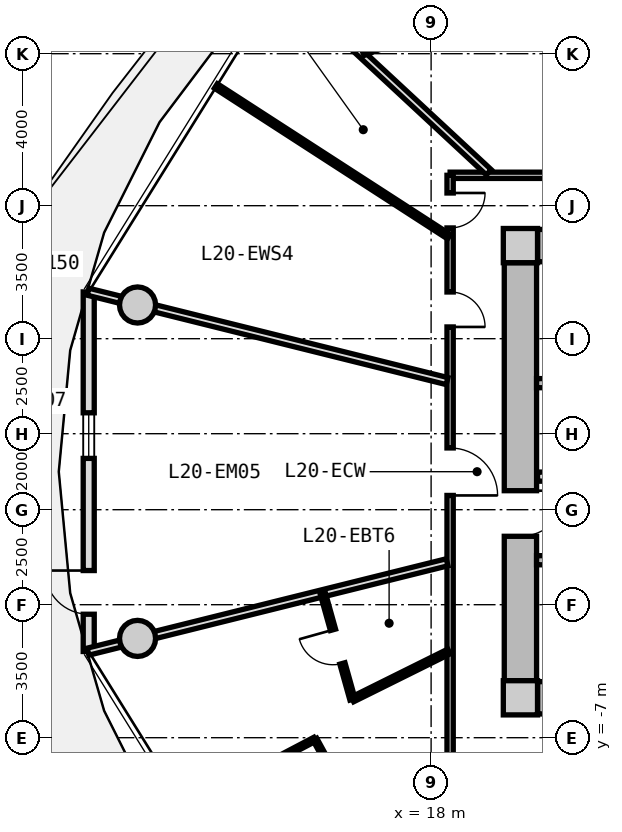
"""IFC4 building model, lengths in metres.
Left out: names, types, materials, properties, quantities, classifications, styles, units other than length and angle.
Written with IfcOpenShell. Run it as: python <this file> out.ifc"""

import sys

from ifc_helpers import new_model, si_unit, direction, frame, frame_2d, origin, origin_2d, place, context, subcontext, project, spatial, rectangle, circle, extrude, source, transform, mapped, element, fill, save


model = new_model("IFC4")
c1 = context("Model", 3, precision=1e-05, world=origin(), true_north=direction((0.0, 1.0)))
c2 = subcontext(c1, "Body", "Model", "MODEL_VIEW")
j1 = project(units=[si_unit("LENGTHUNIT", "METRE"), si_unit("PLANEANGLEUNIT", "RADIAN")], contexts=[c1])
p1 = place(None, origin())
s1 = spatial("IfcSite", under=j1, at=p1, CompositionType="ELEMENT")
p2 = place(p1, origin())
s2 = spatial("IfcBuilding", under=s1, at=p2, CompositionType="ELEMENT")
p3 = place(p2, frame((0.0, 0.0, 67.35)))
s3 = spatial("IfcBuildingStorey", under=s2, at=p3, CompositionType="ELEMENT", Elevation=67.35)
m1 = source(origin(), c2, "Body", "SweptSolid", [
    extrude(rectangle(XDim=0.9, YDim=0.9, at=origin_2d()), origin(), (0.0, 0.0, 1.0), 3.05),
])
for number, where, z_axis, x_axis in (
    (1, (20.35, -5.95, 0.0), (0.0, 0.0, 1.0), (1.0, 0.0, 0.0)),
    (2, (20.35, 5.95, 0.0), (0.0, 0.0, 1.0), (1.0, 0.0, 0.0)),
):
    element("IfcColumn", number, at=place(p3, frame(where, z_axis=z_axis, x_axis=x_axis)), inside=s3, PredefinedType="COLUMN", context=c2, shape_type="MappedRepresentation", body=[
        mapped(m1, transform((0.0, 0.0, 0.0), x_axis=(1.0, 0.0, 0.0), y_axis=(0.0, 1.0, 0.0), z_axis=(0.0, 0.0, 1.0), scale=1.0)),
    ])
m2 = source(origin(), c2, "Body", "SweptSolid", [
    extrude(rectangle(XDim=14.4, YDim=0.85, at=frame_2d((7.2, 0.0))), origin(), (0.0, 0.0, 1.0), 2.79),
])
for number, where, z_axis, x_axis in (
    (3, (20.8, 5.95, 0.0), (0.0, 0.0, 1.0), (1.0, 0.0, 0.0)),
    (4, (35.2, -5.95, 0.0), (0.0, 0.0, 1.0), (-1.0, 0.0, 0.0)),
):
    element("IfcWall", number, at=place(p3, frame(where, z_axis=z_axis, x_axis=x_axis)), inside=s3, PredefinedType="SHEAR", context=c2, shape_type="MappedRepresentation", body=[
        mapped(m2, transform((0.0, 0.0, 0.0), x_axis=(1.0, 0.0, 0.0), y_axis=(0.0, 1.0, 0.0), z_axis=(0.0, 0.0, 1.0), scale=1.0)),
    ])
m3 = source(origin(), c2, "Body", "SweptSolid", [
    extrude(rectangle(XDim=11.0, YDim=0.85, at=frame_2d((5.5, 0.0))), origin(), (0.0, 0.0, 1.0), 2.79),
])
p4 = place(p3, frame((20.35, -5.5, 0.0), z_axis=(0.0, 0.0, 1.0), x_axis=(0.0, 1.0, 0.0)))
e5 = element("IfcWall", 5, at=p4, inside=s3, PredefinedType="SHEAR", context=c2, shape_type="MappedRepresentation", body=[
    mapped(m3, transform((0.0, 0.0, 0.0), x_axis=(1.0, 0.0, 0.0), y_axis=(0.0, 1.0, 0.0), z_axis=(0.0, 0.0, 1.0), scale=1.0)),
])
p5 = place(p4, frame((3.8, 0.0, 0.0)))
e6 = element("IfcOpeningElement", 6, at=p5, cuts=e5, PredefinedType="OPENING", context=c2, shape_type="SweptSolid", body=[
    extrude(rectangle(XDim=1.2, YDim=2.15, at=frame_2d((0.6, 1.075))), frame((0.0, 0.435, 0.0), z_axis=(0.0, -1.0, 0.0), x_axis=(1.0, 0.0, 0.0)), (0.0, 0.0, 1.0), 0.87),
])
m4 = source(origin(), c2, "Body", "SweptSolid", [
    extrude(circle(Radius=0.475, at=origin_2d()), origin(), (0.0, 0.0, 1.0), 3.05),
])
for number, where, z_axis, x_axis in (
    (7, (10.275, 4.387, 0.0), (0.0, 0.0, 1.0), (1.0, 0.0, 0.0)),
    (8, (10.275, -4.387, 0.0), (0.0, 0.0, 1.0), (1.0, 0.0, 0.0)),
):
    element("IfcColumn", number, at=place(p3, frame(where, z_axis=z_axis, x_axis=x_axis)), inside=s3, PredefinedType="COLUMN", context=c2, shape_type="MappedRepresentation", body=[
        mapped(m4, transform((0.0, 0.0, 0.0), x_axis=(1.0, 0.0, 0.0), y_axis=(0.0, 1.0, 0.0), z_axis=(0.0, 0.0, 1.0), scale=1.0)),
    ])
m5 = source(origin(), c2, "Body", "SweptSolid", [
    extrude(rectangle(XDim=9.462, YDim=0.29, at=frame_2d((4.731, 0.0))), origin(), (0.0, 0.0, 1.0), 2.79),
])
p6 = place(p3, frame((8.99, -4.731, 0.0), z_axis=(0.0, 0.0, 1.0), x_axis=(0.0, 1.0, 0.0)))
e9 = element("IfcWall", 9, at=p6, inside=s3, PredefinedType="SOLIDWALL", context=c2, shape_type="MappedRepresentation", body=[
    mapped(m5, transform((0.0, 0.0, 0.0), x_axis=(1.0, 0.0, 0.0), y_axis=(0.0, 1.0, 0.0), z_axis=(0.0, 0.0, 1.0), scale=1.0)),
])
p7 = place(p6, frame((0.98, 0.0, 0.0)))
e10 = element("IfcOpeningElement", 10, at=p7, cuts=e9, PredefinedType="OPENING", context=c2, shape_type="SweptSolid", body=[
    extrude(rectangle(XDim=1.15, YDim=2.25, at=frame_2d((0.575, 1.125))), frame((0.0, 0.155, 0.0), z_axis=(0.0, -1.0, 0.0), x_axis=(1.0, 0.0, 0.0)), (0.0, 0.0, 1.0), 0.31),
])
p8 = place(p6, frame((5.081, 0.0, 0.85)))
e11 = element("IfcOpeningElement", 11, at=p8, cuts=e9, PredefinedType="OPENING", context=c2, shape_type="SweptSolid", body=[
    extrude(rectangle(XDim=1.2, YDim=1.5, at=frame_2d((0.6, 0.75))), frame((0.0, 0.155, 0.0), z_axis=(0.0, -1.0, 0.0), x_axis=(1.0, 0.0, 0.0)), (0.0, 0.0, 1.0), 0.31),
])
m6 = source(origin(), c2, "Body", "SweptSolid", [
    extrude(rectangle(XDim=7.765, YDim=0.24, at=frame_2d((3.883, 0.0))), origin(), (0.0, 0.0, 1.0), 2.79),
])
p9 = place(p3, frame((20.775, 2.33, 0.0), z_axis=(0.0, 0.0, 1.0), x_axis=(1.0, 0.0, 0.0)))
e12 = element("IfcWall", 12, at=p9, inside=s3, PredefinedType="PARTITIONING", context=c2, shape_type="MappedRepresentation", body=[
    mapped(m6, transform((0.0, 0.0, 0.0), x_axis=(1.0, 0.0, 0.0), y_axis=(0.0, 1.0, 0.0), z_axis=(0.0, 0.0, 1.0), scale=1.0)),
])
p10 = place(p3, frame((20.775, -2.33, 0.0), z_axis=(0.0, 0.0, 1.0), x_axis=(1.0, 0.0, 0.0)))
e13 = element("IfcWall", 13, at=p10, inside=s3, PredefinedType="PARTITIONING", context=c2, shape_type="MappedRepresentation", body=[
    mapped(m6, transform((0.0, 0.0, 0.0), x_axis=(1.0, 0.0, 0.0), y_axis=(0.0, 1.0, 0.0), z_axis=(0.0, 0.0, 1.0), scale=1.0)),
])
p11 = place(p10, frame((0.885, 0.0, 0.0)))
e14 = element("IfcOpeningElement", 14, at=p11, cuts=e13, PredefinedType="OPENING", context=c2, shape_type="SweptSolid", body=[
    extrude(rectangle(XDim=1.1, YDim=2.15, at=frame_2d((0.55, 1.075))), frame((0.0, 0.13, 0.0), z_axis=(0.0, -1.0, 0.0), x_axis=(1.0, 0.0, 0.0)), (0.0, 0.0, 1.0), 0.26),
])
m7 = source(origin(), c2, "Body", "SweptSolid", [
    extrude(rectangle(XDim=7.62, YDim=0.24, at=frame_2d((3.81, 0.0))), origin(), (0.0, 0.0, 1.0), 2.775),
])
p12 = place(p3, frame((20.8, -0.13, 0.0), z_axis=(0.0, 0.0, 1.0), x_axis=(1.0, 0.0, 0.0)))
e15 = element("IfcWall", 15, at=p12, inside=s3, PredefinedType="PARTITIONING", context=c2, shape_type="MappedRepresentation", body=[
    mapped(m7, transform((0.0, 0.0, 0.0), x_axis=(1.0, 0.0, 0.0), y_axis=(0.0, 1.0, 0.0), z_axis=(0.0, 0.0, 1.0), scale=1.0)),
])
p13 = place(p12, frame((6.22, 0.0, 0.0)))
e16 = element("IfcOpeningElement", 16, at=p13, cuts=e15, PredefinedType="OPENING", context=c2, shape_type="SweptSolid", body=[
    extrude(rectangle(XDim=1.0, YDim=2.1, at=frame_2d((0.5, 1.05))), frame((0.0, 0.13, 0.0), z_axis=(0.0, -1.0, 0.0), x_axis=(1.0, 0.0, 0.0)), (0.0, 0.0, 1.0), 0.26),
])
p14 = place(p12, frame((0.85, 0.0, 0.0)))
e17 = element("IfcOpeningElement", 17, at=p14, cuts=e15, PredefinedType="OPENING", context=c2, shape_type="SweptSolid", body=[
    extrude(rectangle(XDim=1.1, YDim=2.2, at=frame_2d((0.55, 1.1))), frame((0.0, 0.13, 0.0), z_axis=(0.0, -1.0, 0.0), x_axis=(1.0, 0.0, 0.0)), (0.0, 0.0, 1.0), 0.26),
])
p15 = place(p12, frame((3.85, 0.0, 0.0)))
e18 = element("IfcOpeningElement", 18, at=p15, cuts=e15, PredefinedType="OPENING", context=c2, shape_type="SweptSolid", body=[
    extrude(rectangle(XDim=1.1, YDim=2.2, at=frame_2d((0.55, 1.1))), frame((0.0, 0.13, 0.0), z_axis=(0.0, -1.0, 0.0), x_axis=(1.0, 0.0, 0.0)), (0.0, 0.0, 1.0), 0.26),
])
m8 = source(origin(), c2, "Body", "SweptSolid", [
    extrude(rectangle(XDim=19.0, YDim=0.165, at=frame_2d((9.5, 0.0))), origin(), (0.0, 0.0, 1.0), 2.775),
])
p16 = place(p3, frame((18.5, 7.8, 0.0), z_axis=(0.0, 0.0, 1.0), x_axis=(1.0, 0.0, 0.0)))
e19 = element("IfcWall", 19, at=p16, inside=s3, PredefinedType="PARTITIONING", context=c2, shape_type="MappedRepresentation", body=[
    mapped(m8, transform((0.0, 0.0, 0.0), x_axis=(1.0, 0.0, 0.0), y_axis=(0.0, 1.0, 0.0), z_axis=(0.0, 0.0, 1.0), scale=1.0)),
])
p17 = place(p16, frame((9.35, 0.0, 0.0)))
e20 = element("IfcOpeningElement", 20, at=p17, cuts=e19, PredefinedType="OPENING", context=c2, shape_type="SweptSolid", body=[
    extrude(rectangle(XDim=1.05, YDim=2.15, at=frame_2d((0.525, 1.075))), frame((0.0, 0.093, 0.0), z_axis=(0.0, -1.0, 0.0), x_axis=(1.0, 0.0, 0.0)), (0.0, 0.0, 1.0), 0.185),
])
m9 = source(origin(), c2, "Body", "SweptSolid", [
    extrude(rectangle(XDim=15.6, YDim=0.165, at=frame_2d((7.8, 0.0))), origin(), (0.0, 0.0, 1.0), 2.775),
])
p18 = place(p3, frame((18.5, -7.8, 0.0), z_axis=(0.0, 0.0, 1.0), x_axis=(0.0, 1.0, 0.0)))
e21 = element("IfcWall", 21, at=p18, inside=s3, PredefinedType="PARTITIONING", context=c2, shape_type="MappedRepresentation", body=[
    mapped(m9, transform((0.0, 0.0, 0.0), x_axis=(1.0, 0.0, 0.0), y_axis=(0.0, 1.0, 0.0), z_axis=(0.0, 0.0, 1.0), scale=1.0)),
])
p19 = place(p18, frame((14.215, 0.0, 0.0)))
e22 = element("IfcOpeningElement", 22, at=p19, cuts=e21, PredefinedType="OPENING", context=c2, shape_type="SweptSolid", body=[
    extrude(rectangle(XDim=0.92, YDim=2.1, at=frame_2d((0.46, 1.05))), frame((0.0, 0.093, 0.0), z_axis=(0.0, -1.0, 0.0), x_axis=(1.0, 0.0, 0.0)), (0.0, 0.0, 1.0), 0.185),
])
p20 = place(p18, frame((11.609, 0.0, 0.0)))
e23 = element("IfcOpeningElement", 23, at=p20, cuts=e21, PredefinedType="OPENING", context=c2, shape_type="SweptSolid", body=[
    extrude(rectangle(XDim=0.92, YDim=2.1, at=frame_2d((0.46, 1.05))), frame((0.0, 0.093, 0.0), z_axis=(0.0, -1.0, 0.0), x_axis=(1.0, 0.0, 0.0)), (0.0, 0.0, 1.0), 0.185),
])
p21 = place(p18, frame((7.175, 0.0, 0.0)))
e24 = element("IfcOpeningElement", 24, at=p21, cuts=e21, PredefinedType="OPENING", context=c2, shape_type="SweptSolid", body=[
    extrude(rectangle(XDim=1.25, YDim=2.2, at=frame_2d((0.625, 1.1))), frame((0.0, 0.093, 0.0), z_axis=(0.0, -1.0, 0.0), x_axis=(1.0, 0.0, 0.0)), (0.0, 0.0, 1.0), 0.185),
])
m10 = source(origin(), c2, "Body", "SweptSolid", [
    extrude(rectangle(XDim=9.737, YDim=0.19, at=frame_2d((4.869, 0.0))), origin(), (0.0, 0.0, 1.0), 2.225),
])
p22 = place(p3, frame((18.42, -2.385, 0.0), z_axis=(0.0, 0.0, 1.0), x_axis=(-0.970392716238, -0.241532557375, 0.0)))
e25 = element("IfcWall", 25, at=p22, inside=s3, PredefinedType="PARTITIONING", context=c2, shape_type="MappedRepresentation", body=[
    mapped(m10, transform((0.0, 0.0, 0.0), x_axis=(1.0, 0.0, 0.0), y_axis=(0.0, 1.0, 0.0), z_axis=(0.0, 0.0, 1.0), scale=1.0)),
])
m11 = source(origin(), c2, "Body", "SweptSolid", [
    extrude(rectangle(XDim=2.834, YDim=0.14, at=frame_2d((1.417, 0.0))), origin(), (0.0, 0.0, 1.0), 2.775),
])
p23 = place(p3, frame((18.47, -4.732, 0.0), z_axis=(0.0, 0.0, 1.0), x_axis=(-0.895681174462, -0.444696788513, 0.0)))
e26 = element("IfcWall", 26, at=p23, inside=s3, PredefinedType="PARTITIONING", context=c2, shape_type="MappedRepresentation", body=[
    mapped(m11, transform((0.0, 0.0, 0.0), x_axis=(1.0, 0.0, 0.0), y_axis=(0.0, 1.0, 0.0), z_axis=(0.0, 0.0, 1.0), scale=1.0)),
])
m12 = source(origin(), c2, "Body", "SweptSolid", [
    extrude(rectangle(XDim=2.885, YDim=0.14, at=frame_2d((1.442, 0.0))), origin(), (0.0, 0.0, 1.0), 2.775),
])
p24 = place(p3, frame((15.931, -5.992, 0.0), z_axis=(0.0, 0.0, 1.0), x_axis=(-0.269799431837, 0.962916541856, 0.0)))
e27 = element("IfcWall", 27, at=p24, inside=s3, PredefinedType="PARTITIONING", context=c2, shape_type="MappedRepresentation", body=[
    mapped(m12, transform((0.0, 0.0, 0.0), x_axis=(1.0, 0.0, 0.0), y_axis=(0.0, 1.0, 0.0), z_axis=(0.0, 0.0, 1.0), scale=1.0)),
])
p25 = place(p24, frame((0.982, 0.0, 0.0)))
e28 = element("IfcOpeningElement", 28, at=p25, cuts=e27, PredefinedType="OPENING", context=c2, shape_type="SweptSolid", body=[
    extrude(rectangle(XDim=0.92, YDim=2.1, at=frame_2d((0.46, 1.05))), frame((0.0, 0.08, 0.0), z_axis=(0.0, -1.0, 0.0), x_axis=(1.0, 0.0, 0.0)), (0.0, 0.0, 1.0), 0.16),
])
m13 = source(origin(), c2, "Body", "SweptSolid", [
    extrude(rectangle(XDim=3.864, YDim=0.115, at=frame_2d((1.932, 0.0))), origin(), (0.0, 0.0, 1.0), 2.775),
])
p26 = place(p3, frame((14.94, -7.041, 0.0), z_axis=(0.0, 0.0, 1.0), x_axis=(-0.885194959803, -0.465220252289, 0.0)))
e29 = element("IfcWall", 29, at=p26, inside=s3, PredefinedType="PARTITIONING", context=c2, shape_type="MappedRepresentation", body=[
    mapped(m13, transform((0.0, 0.0, 0.0), x_axis=(1.0, 0.0, 0.0), y_axis=(0.0, 1.0, 0.0), z_axis=(0.0, 0.0, 1.0), scale=1.0)),
])
m14 = source(origin(), c2, "Body", "SweptSolid", [
    extrude(rectangle(XDim=3.888, YDim=0.115, at=frame_2d((1.944, 0.0))), origin(), (0.0, 0.0, 1.0), 2.775),
])
p27 = place(p3, frame((14.94, -7.041, 0.0), z_axis=(0.0, 0.0, 1.0), x_axis=(0.480382482853, -0.877059103007, 0.0)))
e30 = element("IfcWall", 30, at=p27, inside=s3, PredefinedType="PARTITIONING", context=c2, shape_type="MappedRepresentation", body=[
    mapped(m14, transform((0.0, 0.0, 0.0), x_axis=(1.0, 0.0, 0.0), y_axis=(0.0, 1.0, 0.0), z_axis=(0.0, 0.0, 1.0), scale=1.0)),
])
p28 = place(p27, frame((1.469, 0.0, 0.0)))
e31 = element("IfcOpeningElement", 31, at=p28, cuts=e30, PredefinedType="OPENING", context=c2, shape_type="SweptSolid", body=[
    extrude(rectangle(XDim=0.95, YDim=2.1, at=frame_2d((0.475, 1.05))), frame((0.0, 0.067, 0.0), z_axis=(0.0, -1.0, 0.0), x_axis=(1.0, 0.0, 0.0)), (0.0, 0.0, 1.0), 0.135),
])
m15 = source(origin(), c2, "Body", "SweptSolid", [
    extrude(rectangle(XDim=7.435, YDim=0.19, at=frame_2d((3.717, 0.0))), origin(), (0.0, 0.0, 1.0), 2.225),
])
p29 = place(p3, frame((19.517, 7.88, 0.0), z_axis=(0.0, 0.0, 1.0), x_axis=(-0.732651956848, 0.680603489652, 0.0)))
e32 = element("IfcWall", 32, at=p29, inside=s3, PredefinedType="PARTITIONING", context=c2, shape_type="MappedRepresentation", body=[
    mapped(m15, transform((0.0, 0.0, 0.0), x_axis=(1.0, 0.0, 0.0), y_axis=(0.0, 1.0, 0.0), z_axis=(0.0, 0.0, 1.0), scale=1.0)),
])
m16 = source(origin(), c2, "Body", "SweptSolid", [
    extrude(rectangle(XDim=8.32, YDim=0.115, at=frame_2d((4.16, 0.0))), origin(), (0.0, 0.0, 1.0), 2.775),
])
p30 = place(p3, frame((24.003, 13.93, 0.0), z_axis=(0.0, 0.0, 1.0), x_axis=(-0.936180763098, -0.351518959382, 0.0)))
e33 = element("IfcWall", 33, at=p30, inside=s3, PredefinedType="PARTITIONING", context=c2, shape_type="MappedRepresentation", body=[
    mapped(m16, transform((0.0, 0.0, 0.0), x_axis=(1.0, 0.0, 0.0), y_axis=(0.0, 1.0, 0.0), z_axis=(0.0, 0.0, 1.0), scale=1.0)),
])
p31 = place(p30, frame((3.685, 0.0, 0.0)))
e34 = element("IfcOpeningElement", 34, at=p31, cuts=e33, PredefinedType="OPENING", context=c2, shape_type="SweptSolid", body=[
    extrude(rectangle(XDim=0.95, YDim=2.1, at=frame_2d((0.475, 1.05))), frame((0.0, 0.067, 0.0), z_axis=(0.0, -1.0, 0.0), x_axis=(1.0, 0.0, 0.0)), (0.0, 0.0, 1.0), 0.135),
])
m17 = source(origin(), c2, "Body", "SweptSolid", [
    extrude(rectangle(XDim=9.737, YDim=0.19, at=frame_2d((4.869, 0.0))), origin(), (0.0, 0.0, 1.0), 2.415),
])
p32 = place(p3, frame((18.42, 2.385, 0.0), z_axis=(0.0, 0.0, 1.0), x_axis=(-0.970392716238, 0.241532557375, 0.0)))
e35 = element("IfcWall", 35, at=p32, inside=s3, PredefinedType="PARTITIONING", context=c2, shape_type="MappedRepresentation", body=[
    mapped(m17, transform((0.0, 0.0, 0.0), x_axis=(1.0, 0.0, 0.0), y_axis=(0.0, 1.0, 0.0), z_axis=(0.0, 0.0, 1.0), scale=1.0)),
])
m18 = source(origin(), c2, "Body", "SweptSolid", [
    extrude(rectangle(XDim=7.304, YDim=0.14, at=frame_2d((3.652, 0.0))), origin(), (0.0, 0.0, 1.0), 2.775),
])
p33 = place(p3, frame((18.47, 6.185, 0.0), z_axis=(0.0, 0.0, 1.0), x_axis=(-0.83973870965, 0.54299069929, 0.0)))
e36 = element("IfcWall", 36, at=p33, inside=s3, PredefinedType="PARTITIONING", context=c2, shape_type="MappedRepresentation", body=[
    mapped(m18, transform((0.0, 0.0, 0.0), x_axis=(1.0, 0.0, 0.0), y_axis=(0.0, 1.0, 0.0), z_axis=(0.0, 0.0, 1.0), scale=1.0)),
])
m19 = source(origin(), c2, "Body", "SweptSolid", [
    extrude(rectangle(XDim=1.15, YDim=2.25, at=frame_2d((0.575, 1.125))), frame((0.0, 0.025, 0.0), z_axis=(0.0, -1.0, 0.0), x_axis=(1.0, 0.0, 0.0)), (0.0, 0.0, 1.0), 0.05),
])
p34 = place(p7, origin())
e37 = element("IfcDoor", 37, at=p34, inside=s3, OperationType="SINGLE_SWING_RIGHT", PredefinedType="DOOR", context=c2, shape_type="MappedRepresentation", body=[
    mapped(m19, transform((0.0, 0.0, 0.0), x_axis=(1.0, 0.0, 0.0), y_axis=(0.0, 1.0, 0.0), z_axis=(0.0, 0.0, 1.0), scale=1.0)),
])
fill(e10, e37)
m20 = source(origin(), c2, "Body", "SweptSolid", [
    extrude(rectangle(XDim=1.2, YDim=1.5, at=frame_2d((0.6, 0.75))), frame((0.0, 0.03, 0.0), z_axis=(0.0, -1.0, 0.0), x_axis=(1.0, 0.0, 0.0)), (0.0, 0.0, 1.0), 0.06),
])
p35 = place(p8, origin())
e38 = element("IfcWindow", 38, at=p35, inside=s3, PartitioningType="SINGLE_PANEL", PredefinedType="WINDOW", context=c2, shape_type="MappedRepresentation", body=[
    mapped(m20, transform((0.0, 0.0, 0.0), x_axis=(1.0, 0.0, 0.0), y_axis=(0.0, 1.0, 0.0), z_axis=(0.0, 0.0, 1.0), scale=1.0)),
])
fill(e11, e38)
m21 = source(origin(), c2, "Body", "SweptSolid", [
    extrude(rectangle(XDim=1.2, YDim=2.15, at=frame_2d((0.6, 1.075))), frame((0.0, 0.025, 0.0), z_axis=(0.0, -1.0, 0.0), x_axis=(1.0, 0.0, 0.0)), (0.0, 0.0, 1.0), 0.05),
])
p36 = place(p5, frame((1.2, 0.0, 0.0), z_axis=(0.0, 0.0, 1.0), x_axis=(-1.0, 0.0, 0.0)))
e39 = element("IfcDoor", 39, at=p36, inside=s3, OperationType="SINGLE_SWING_LEFT", PredefinedType="DOOR", context=c2, shape_type="MappedRepresentation", body=[
    mapped(m21, transform((0.0, 0.0, 0.0), x_axis=(1.0, 0.0, 0.0), y_axis=(0.0, 1.0, 0.0), z_axis=(0.0, 0.0, 1.0), scale=1.0)),
])
fill(e6, e39)
m22 = source(origin(), c2, "Body", "SweptSolid", [
    extrude(rectangle(XDim=0.92, YDim=2.1, at=frame_2d((0.46, 1.05))), frame((0.0, 0.025, 0.0), z_axis=(0.0, -1.0, 0.0), x_axis=(1.0, 0.0, 0.0)), (0.0, 0.0, 1.0), 0.05),
])
p37 = place(p25, origin())
e40 = element("IfcDoor", 40, at=p37, inside=s3, OperationType="SINGLE_SWING_RIGHT", PredefinedType="DOOR", context=c2, shape_type="MappedRepresentation", body=[
    mapped(m22, transform((0.0, 0.0, 0.0), x_axis=(1.0, 0.0, 0.0), y_axis=(0.0, 1.0, 0.0), z_axis=(0.0, 0.0, 1.0), scale=1.0)),
])
fill(e28, e40)
p38 = place(p19, frame((0.92, 0.0, 0.0), z_axis=(0.0, 0.0, 1.0), x_axis=(-1.0, 0.0, 0.0)))
e41 = element("IfcDoor", 41, at=p38, inside=s3, OperationType="SINGLE_SWING_LEFT", PredefinedType="DOOR", context=c2, shape_type="MappedRepresentation", body=[
    mapped(m22, transform((0.0, 0.0, 0.0), x_axis=(1.0, 0.0, 0.0), y_axis=(0.0, 1.0, 0.0), z_axis=(0.0, 0.0, 1.0), scale=1.0)),
])
fill(e22, e41)
p39 = place(p20, frame((0.92, 0.0, 0.0), z_axis=(0.0, 0.0, 1.0), x_axis=(-1.0, 0.0, 0.0)))
e42 = element("IfcDoor", 42, at=p39, inside=s3, OperationType="SINGLE_SWING_RIGHT", PredefinedType="DOOR", context=c2, shape_type="MappedRepresentation", body=[
    mapped(m22, transform((0.0, 0.0, 0.0), x_axis=(1.0, 0.0, 0.0), y_axis=(0.0, 1.0, 0.0), z_axis=(0.0, 0.0, 1.0), scale=1.0)),
])
fill(e23, e42)
m23 = source(origin(), c2, "Body", "SweptSolid", [
    extrude(rectangle(XDim=1.25, YDim=2.2, at=frame_2d((0.625, 1.1))), frame((0.0, 0.025, 0.0), z_axis=(0.0, -1.0, 0.0), x_axis=(1.0, 0.0, 0.0)), (0.0, 0.0, 1.0), 0.05),
])
p40 = place(p21, frame((1.25, 0.0, 0.0), z_axis=(0.0, 0.0, 1.0), x_axis=(-1.0, 0.0, 0.0)))
e43 = element("IfcDoor", 43, at=p40, inside=s3, OperationType="SINGLE_SWING_RIGHT", PredefinedType="DOOR", context=c2, shape_type="MappedRepresentation", body=[
    mapped(m23, transform((0.0, 0.0, 0.0), x_axis=(1.0, 0.0, 0.0), y_axis=(0.0, 1.0, 0.0), z_axis=(0.0, 0.0, 1.0), scale=1.0)),
])
fill(e24, e43)
save(model, sys.argv[1])
